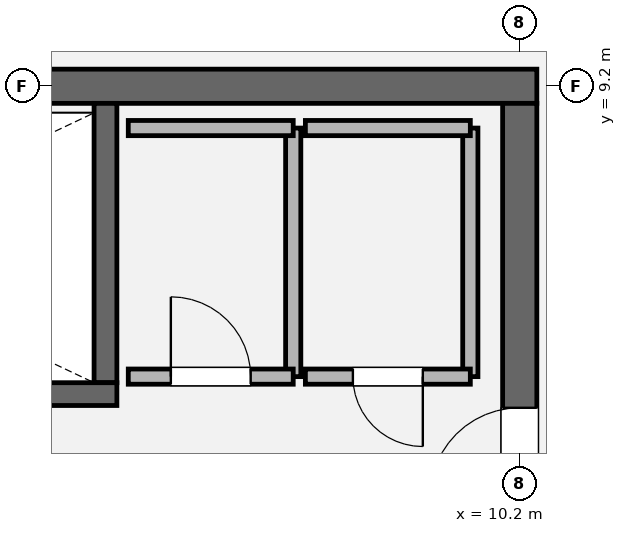
"""IFC4 building model, lengths in metres.
Left out: names, types, materials, properties, quantities, classifications, styles, units other than length and angle.
Written with IfcOpenShell. Run it as: python <this file> out.ifc"""

import sys

from ifc_helpers import new_model, si_unit, direction, frame, frame_2d, origin, place, context, subcontext, project, spatial, rectangle, extrude, element, fill, save


model = new_model("IFC4")
c1 = context("Model", 3, precision=1e-05, world=origin(), true_north=direction((0.0, 1.0)))
c2 = subcontext(c1, "Body", "Model", "MODEL_VIEW")
j1 = project(units=[si_unit("LENGTHUNIT", "METRE"), si_unit("PLANEANGLEUNIT", "RADIAN")], contexts=[c1])
p1 = place(None, origin())
s1 = spatial("IfcSite", under=j1, at=p1, CompositionType="ELEMENT")
p2 = place(p1, origin())
s2 = spatial("IfcBuilding", under=s1, at=p2, CompositionType="ELEMENT")
p3 = place(p2, frame((0.0, 0.0, 325.8)))
s3 = spatial("IfcBuildingStorey", under=s2, at=p3, CompositionType="ELEMENT", Elevation=325.8)
p4 = place(p3, frame((-10.425, 9.2, 0.0), z_axis=(0.0, 0.0, 1.0), x_axis=(1.0, 0.0, 0.0)))
e1 = element("IfcWall", 1, at=p4, inside=s3, PredefinedType="SHEAR", context=c2, shape_type="SweptSolid", body=[
    extrude(rectangle(XDim=20.85, YDim=0.45, at=frame_2d((10.425, 0.0))), origin(), (0.0, 0.0, 1.0), 4.2),
])
p5 = place(p3, frame((10.2, 8.975, 0.0), z_axis=(0.0, 0.0, 1.0), x_axis=(0.0, -1.0, 0.0)))
e2 = element("IfcWall", 2, at=p5, inside=s3, PredefinedType="SHEAR", context=c2, shape_type="SweptSolid", body=[
    extrude(rectangle(XDim=17.95, YDim=0.45, at=frame_2d((8.975, 0.0))), origin(), (0.0, 0.0, 1.0), 4.2),
])
p6 = place(p5, frame((4.005, 0.0, 0.0)))
e3 = element("IfcOpeningElement", 3, at=p6, cuts=e2, PredefinedType="OPENING", context=c2, shape_type="SweptSolid", body=[
    extrude(rectangle(XDim=1.18, YDim=2.2, at=frame_2d((0.59, 1.1))), frame((0.0, 0.235, 0.0), z_axis=(0.0, -1.0, 0.0), x_axis=(1.0, 0.0, 0.0)), (0.0, 0.0, 1.0), 0.47),
])
p7 = place(p3, frame((4.75, 8.975, 0.0), z_axis=(0.0, 0.0, 1.0), x_axis=(0.0, -1.0, 0.0)))
e4 = element("IfcWall", 4, at=p7, inside=s3, PredefinedType="SOLIDWALL", context=c2, shape_type="SweptSolid", body=[
    extrude(rectangle(XDim=3.675, YDim=0.3, at=frame_2d((1.837, 0.0))), origin(), (0.0, 0.0, 1.0), 4.2),
])
p8 = place(p3, frame((-4.9, 5.15, 0.0), z_axis=(0.0, 0.0, 1.0), x_axis=(1.0, 0.0, 0.0)))
e5 = element("IfcWall", 5, at=p8, inside=s3, PredefinedType="SOLIDWALL", context=c2, shape_type="SweptSolid", body=[
    extrude(rectangle(XDim=9.8, YDim=0.3, at=frame_2d((4.9, 0.0))), origin(), (0.0, 0.0, 1.0), 4.2),
])
p9 = place(p8, frame((0.56, 0.0, 0.0)))
e6 = element("IfcOpeningElement", 6, at=p9, cuts=e5, PredefinedType="OPENING", context=c2, shape_type="SweptSolid", body=[
    extrude(rectangle(XDim=1.18, YDim=2.2, at=frame_2d((0.59, 1.1))), frame((0.0, 0.16, 0.0), z_axis=(0.0, -1.0, 0.0), x_axis=(1.0, 0.0, 0.0)), (0.0, 0.0, 1.0), 0.32),
])
p10 = place(p3, frame((7.22, 5.38, 0.0), z_axis=(0.0, 0.0, 1.0), x_axis=(0.0, 1.0, 0.0)))
e7 = element("IfcWall", 7, at=p10, inside=s3, PredefinedType="SOLIDWALL", context=c2, shape_type="SweptSolid", body=[
    extrude(rectangle(XDim=3.27, YDim=0.2, at=frame_2d((1.635, 0.0))), origin(), (0.0, 0.0, 1.0), 4.0),
])
p11 = place(p3, frame((7.22, 8.65, 0.0), z_axis=(0.0, 0.0, 1.0), x_axis=(-1.0, 0.0, 0.0)))
e8 = element("IfcWall", 8, at=p11, inside=s3, PredefinedType="SOLIDWALL", context=c2, shape_type="SweptSolid", body=[
    extrude(rectangle(XDim=2.17, YDim=0.2, at=frame_2d((1.085, 0.0))), origin(), (0.0, 0.0, 1.0), 4.0),
])
p12 = place(p3, frame((5.05, 5.38, 0.0), z_axis=(0.0, 0.0, 1.0), x_axis=(1.0, 0.0, 0.0)))
e9 = element("IfcWall", 9, at=p12, inside=s3, PredefinedType="SOLIDWALL", context=c2, shape_type="SweptSolid", body=[
    extrude(rectangle(XDim=2.17, YDim=0.2, at=frame_2d((1.085, 0.0))), origin(), (0.0, 0.0, 1.0), 4.0),
])
p13 = place(p12, frame((0.56, 0.0, 0.0)))
e10 = element("IfcOpeningElement", 10, at=p13, cuts=e9, PredefinedType="OPENING", context=c2, shape_type="SweptSolid", body=[
    extrude(rectangle(XDim=1.05, YDim=2.2, at=frame_2d((0.525, 1.1))), frame((0.0, 0.11, 0.0), z_axis=(0.0, -1.0, 0.0), x_axis=(1.0, 0.0, 0.0)), (0.0, 0.0, 1.0), 0.22),
])
p14 = place(p3, frame((9.55, 5.38, 0.0), z_axis=(0.0, 0.0, 1.0), x_axis=(0.0, 1.0, 0.0)))
e11 = element("IfcWall", 11, at=p14, inside=s3, PredefinedType="SOLIDWALL", context=c2, shape_type="SweptSolid", body=[
    extrude(rectangle(XDim=3.27, YDim=0.2, at=frame_2d((1.635, 0.0))), origin(), (0.0, 0.0, 1.0), 4.0),
])
p15 = place(p3, frame((9.55, 8.65, 0.0), z_axis=(0.0, 0.0, 1.0), x_axis=(-1.0, 0.0, 0.0)))
e12 = element("IfcWall", 12, at=p15, inside=s3, PredefinedType="SOLIDWALL", context=c2, shape_type="SweptSolid", body=[
    extrude(rectangle(XDim=2.17, YDim=0.2, at=frame_2d((1.085, 0.0))), origin(), (0.0, 0.0, 1.0), 4.0),
])
p16 = place(p3, frame((7.38, 5.38, 0.0), z_axis=(0.0, 0.0, 1.0), x_axis=(1.0, 0.0, 0.0)))
e13 = element("IfcWall", 13, at=p16, inside=s3, PredefinedType="SOLIDWALL", context=c2, shape_type="SweptSolid", body=[
    extrude(rectangle(XDim=2.17, YDim=0.2, at=frame_2d((1.085, 0.0))), origin(), (0.0, 0.0, 1.0), 4.0),
])
p17 = place(p16, frame((0.625, 0.0, 0.0)))
e14 = element("IfcOpeningElement", 14, at=p17, cuts=e13, PredefinedType="OPENING", context=c2, shape_type="SweptSolid", body=[
    extrude(rectangle(XDim=0.92, YDim=2.1, at=frame_2d((0.46, 1.05))), frame((0.0, 0.11, 0.0), z_axis=(0.0, -1.0, 0.0), x_axis=(1.0, 0.0, 0.0)), (0.0, 0.0, 1.0), 0.22),
])
p18 = place(p6, origin())
e15 = element("IfcDoor", 15, at=p18, inside=s3, OperationType="SINGLE_SWING_RIGHT", PredefinedType="DOOR", context=c2, shape_type="SweptSolid", body=[
    extrude(rectangle(XDim=1.18, YDim=2.2, at=frame_2d((0.59, 1.1))), frame((0.0, 0.025, 0.0), z_axis=(0.0, -1.0, 0.0), x_axis=(1.0, 0.0, 0.0)), (0.0, 0.0, 1.0), 0.05),
])
fill(e3, e15)
p19 = place(p13, origin())
e16 = element("IfcDoor", 16, at=p19, inside=s3, OperationType="SINGLE_SWING_LEFT", PredefinedType="DOOR", context=c2, shape_type="SweptSolid", body=[
    extrude(rectangle(XDim=1.05, YDim=2.2, at=frame_2d((0.525, 1.1))), frame((0.0, 0.025, 0.0), z_axis=(0.0, -1.0, 0.0), x_axis=(1.0, 0.0, 0.0)), (0.0, 0.0, 1.0), 0.05),
])
fill(e10, e16)
p20 = place(p17, origin())
e17 = element("IfcDoor", 17, at=p20, inside=s3, OperationType="SINGLE_SWING_RIGHT", PredefinedType="DOOR", context=c2, shape_type="SweptSolid", body=[
    extrude(rectangle(XDim=0.92, YDim=2.1, at=frame_2d((0.46, 1.05))), frame((0.0, 0.025, 0.0), z_axis=(0.0, -1.0, 0.0), x_axis=(1.0, 0.0, 0.0)), (0.0, 0.0, 1.0), 0.05),
])
fill(e14, e17)
save(model, sys.argv[1])
